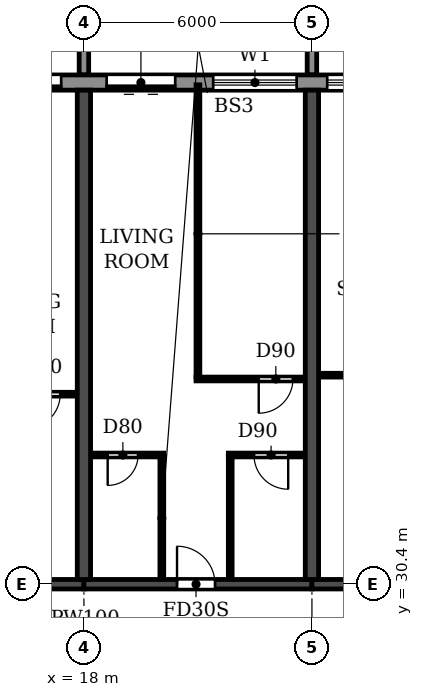
"""IFC4 building model, lengths in metres.
Left out: names, types, materials, properties, quantities, classifications, styles, units other than length and angle.
Written with IfcOpenShell. Run it as: python <this file> out.ifc"""

import sys

from ifc_helpers import new_model, si_unit, direction, frame, frame_2d, origin, place, context, subcontext, project, spatial, polyline, rectangle, outline, extrude, source, transform, mapped, element, fill, save


model = new_model("IFC4")
c1 = context("Model", 3, precision=1e-05, world=origin(), true_north=direction((0.0, 1.0)))
c2 = subcontext(c1, "Body", "Model", "MODEL_VIEW")
j1 = project(units=[si_unit("LENGTHUNIT", "METRE"), si_unit("PLANEANGLEUNIT", "RADIAN")], contexts=[c1])
p1 = place(None, origin())
s1 = spatial("IfcSite", under=j1, at=p1, CompositionType="ELEMENT")
p2 = place(p1, origin())
s2 = spatial("IfcBuilding", under=s1, at=p2, CompositionType="ELEMENT")
p3 = place(p2, frame((0.0, 0.0, 72.9)))
s3 = spatial("IfcBuildingStorey", under=s2, at=p3, CompositionType="ELEMENT", Elevation=72.9)
for number, where, z_axis, x_axis in (
    (1, (18.0, 30.525, 0.0), (0.0, 0.0, 1.0), (0.0, 1.0, 0.0)),
    (2, (24.0, 30.525, 0.0), (0.0, 0.0, 1.0), (0.0, 1.0, 0.0)),
):
    element("IfcWall", number, at=place(p3, frame(where, z_axis=z_axis, x_axis=x_axis)), inside=s3, PredefinedType="SHEAR", context=c2, shape_type="SweptSolid", body=[
        extrude(rectangle(XDim=12.875, YDim=0.35, at=frame_2d((6.438, 0.0))), origin(), (0.0, 0.0, 1.0), 3.06),
    ])
p4 = place(p3, frame((12.0, 30.4, 0.0), z_axis=(0.0, 0.0, 1.0), x_axis=(1.0, 0.0, 0.0)))
e3 = element("IfcWall", 3, at=p4, inside=s3, PredefinedType="SHEAR", context=c2, shape_type="SweptSolid", body=[
    extrude(rectangle(XDim=6.0, YDim=0.25, at=frame_2d((3.0, 0.0))), origin(), (0.0, 0.0, 1.0), 2.46),
])
p5 = place(p4, frame((2.45, 0.0, 0.0)))
e4 = element("IfcOpeningElement", 4, at=p5, cuts=e3, PredefinedType="OPENING", context=c2, shape_type="SweptSolid", body=[
    extrude(rectangle(XDim=1.0, YDim=2.1, at=frame_2d((0.5, 1.05))), frame((0.0, 0.135, 0.0), z_axis=(0.0, -1.0, 0.0), x_axis=(1.0, 0.0, 0.0)), (0.0, 0.0, 1.0), 0.27),
])
p6 = place(p3, frame((18.0, 30.4, 0.0), z_axis=(0.0, 0.0, 1.0), x_axis=(1.0, 0.0, 0.0)))
e5 = element("IfcWall", 5, at=p6, inside=s3, PredefinedType="SHEAR", context=c2, shape_type="SweptSolid", body=[
    extrude(rectangle(XDim=6.0, YDim=0.25, at=frame_2d((3.0, 0.0))), origin(), (0.0, 0.0, 1.0), 2.46),
])
p7 = place(p6, frame((2.45, 0.0, 0.0)))
e6 = element("IfcOpeningElement", 6, at=p7, cuts=e5, PredefinedType="OPENING", context=c2, shape_type="SweptSolid", body=[
    extrude(rectangle(XDim=1.0, YDim=2.1, at=frame_2d((0.5, 1.05))), frame((0.0, 0.135, 0.0), z_axis=(0.0, -1.0, 0.0), x_axis=(1.0, 0.0, 0.0)), (0.0, 0.0, 1.0), 0.27),
])
p8 = place(p3, frame((24.0, 30.4, 0.0), z_axis=(0.0, 0.0, 1.0), x_axis=(1.0, 0.0, 0.0)))
e7 = element("IfcWall", 7, at=p8, inside=s3, PredefinedType="SHEAR", context=c2, shape_type="SweptSolid", body=[
    extrude(rectangle(XDim=6.0, YDim=0.25, at=frame_2d((3.0, 0.0))), origin(), (0.0, 0.0, 1.0), 2.46),
])
p9 = place(p8, frame((2.55, 0.0, 0.0)))
e8 = element("IfcOpeningElement", 8, at=p9, cuts=e7, PredefinedType="OPENING", context=c2, shape_type="SweptSolid", body=[
    extrude(rectangle(XDim=1.0, YDim=2.1, at=frame_2d((0.5, 1.05))), frame((0.0, 0.135, 0.0), z_axis=(0.0, -1.0, 0.0), x_axis=(1.0, 0.0, 0.0)), (0.0, 0.0, 1.0), 0.27),
])
p10 = place(p3, frame((91.317, 43.6, 0.0), z_axis=(0.0, 0.0, 1.0), x_axis=(-1.0, 0.0, 0.0)))
e9 = element("IfcWall", 9, at=p10, inside=s3, PredefinedType="STANDARD", context=c2, shape_type="SweptSolid", body=[
    extrude(rectangle(XDim=80.634, YDim=0.4, at=frame_2d((40.317, 0.0))), origin(), (0.0, 0.0, 1.0), 3.06),
])
p11 = place(p10, frame((76.717, 0.0, 0.9)))
e10 = element("IfcOpeningElement", 10, at=p11, cuts=e9, PredefinedType="OPENING", context=c2, shape_type="SweptSolid", body=[
    extrude(rectangle(XDim=2.2, YDim=1.5, at=frame_2d((1.1, 0.75))), frame((0.0, 0.21, 0.0), z_axis=(0.0, -1.0, 0.0), x_axis=(1.0, 0.0, 0.0)), (0.0, 0.0, 1.0), 0.42),
])
p12 = place(p10, frame((73.917, 0.0, 0.0)))
e11 = element("IfcOpeningElement", 11, at=p12, cuts=e9, PredefinedType="OPENING", context=c2, shape_type="SweptSolid", body=[
    extrude(rectangle(XDim=1.8, YDim=2.4, at=frame_2d((0.9, 1.2))), frame((0.0, 0.21, 0.0), z_axis=(0.0, -1.0, 0.0), x_axis=(1.0, 0.0, 0.0)), (0.0, 0.0, 1.0), 0.42),
])
p13 = place(p10, frame((70.917, 0.0, 0.0)))
e12 = element("IfcOpeningElement", 12, at=p13, cuts=e9, PredefinedType="OPENING", context=c2, shape_type="SweptSolid", body=[
    extrude(rectangle(XDim=1.8, YDim=2.4, at=frame_2d((0.9, 1.2))), frame((0.0, 0.21, 0.0), z_axis=(0.0, -1.0, 0.0), x_axis=(1.0, 0.0, 0.0)), (0.0, 0.0, 1.0), 0.42),
])
p14 = place(p10, frame((67.717, 0.0, 0.9)))
e13 = element("IfcOpeningElement", 13, at=p14, cuts=e9, PredefinedType="OPENING", context=c2, shape_type="SweptSolid", body=[
    extrude(rectangle(XDim=2.2, YDim=1.5, at=frame_2d((1.1, 0.75))), frame((0.0, 0.21, 0.0), z_axis=(0.0, -1.0, 0.0), x_axis=(1.0, 0.0, 0.0)), (0.0, 0.0, 1.0), 0.42),
])
p15 = place(p10, frame((64.717, 0.0, 0.9)))
e14 = element("IfcOpeningElement", 14, at=p15, cuts=e9, PredefinedType="OPENING", context=c2, shape_type="SweptSolid", body=[
    extrude(rectangle(XDim=2.2, YDim=1.5, at=frame_2d((1.1, 0.75))), frame((0.0, 0.21, 0.0), z_axis=(0.0, -1.0, 0.0), x_axis=(1.0, 0.0, 0.0)), (0.0, 0.0, 1.0), 0.42),
])
p16 = place(p10, frame((61.917, 0.0, 0.0)))
e15 = element("IfcOpeningElement", 15, at=p16, cuts=e9, PredefinedType="OPENING", context=c2, shape_type="SweptSolid", body=[
    extrude(rectangle(XDim=1.8, YDim=2.4, at=frame_2d((0.9, 1.2))), frame((0.0, 0.21, 0.0), z_axis=(0.0, -1.0, 0.0), x_axis=(1.0, 0.0, 0.0)), (0.0, 0.0, 1.0), 0.42),
])
p17 = place(p10, frame((58.717, 0.0, 0.9)))
e16 = element("IfcOpeningElement", 16, at=p17, cuts=e9, PredefinedType="OPENING", context=c2, shape_type="SweptSolid", body=[
    extrude(rectangle(XDim=2.2, YDim=1.5, at=frame_2d((1.1, 0.75))), frame((0.0, 0.21, 0.0), z_axis=(0.0, -1.0, 0.0), x_axis=(1.0, 0.0, 0.0)), (0.0, 0.0, 1.0), 0.42),
])
p18 = place(p10, frame((55.917, 0.0, 0.0)))
e17 = element("IfcOpeningElement", 17, at=p18, cuts=e9, PredefinedType="OPENING", context=c2, shape_type="SweptSolid", body=[
    extrude(rectangle(XDim=1.8, YDim=2.4, at=frame_2d((0.9, 1.2))), frame((0.0, 0.21, 0.0), z_axis=(0.0, -1.0, 0.0), x_axis=(1.0, 0.0, 0.0)), (0.0, 0.0, 1.0), 0.42),
])
p19 = place(p10, frame((52.717, 0.0, 0.9)))
e18 = element("IfcOpeningElement", 18, at=p19, cuts=e9, PredefinedType="OPENING", context=c2, shape_type="SweptSolid", body=[
    extrude(rectangle(XDim=2.2, YDim=1.5, at=frame_2d((1.1, 0.75))), frame((0.0, 0.21, 0.0), z_axis=(0.0, -1.0, 0.0), x_axis=(1.0, 0.0, 0.0)), (0.0, 0.0, 1.0), 0.42),
])
p20 = place(p10, frame((49.717, 0.0, 0.9)))
e19 = element("IfcOpeningElement", 19, at=p20, cuts=e9, PredefinedType="OPENING", context=c2, shape_type="SweptSolid", body=[
    extrude(rectangle(XDim=2.2, YDim=1.5, at=frame_2d((1.1, 0.75))), frame((0.0, 0.21, 0.0), z_axis=(0.0, -1.0, 0.0), x_axis=(1.0, 0.0, 0.0)), (0.0, 0.0, 1.0), 0.42),
])
p21 = place(p10, frame((46.917, 0.0, 0.0)))
e20 = element("IfcOpeningElement", 20, at=p21, cuts=e9, PredefinedType="OPENING", context=c2, shape_type="SweptSolid", body=[
    extrude(rectangle(XDim=1.8, YDim=2.4, at=frame_2d((0.9, 1.2))), frame((0.0, 0.21, 0.0), z_axis=(0.0, -1.0, 0.0), x_axis=(1.0, 0.0, 0.0)), (0.0, 0.0, 1.0), 0.42),
])
p22 = place(p10, frame((43.717, 0.0, 0.9)))
e21 = element("IfcOpeningElement", 21, at=p22, cuts=e9, PredefinedType="OPENING", context=c2, shape_type="SweptSolid", body=[
    extrude(rectangle(XDim=2.2, YDim=1.5, at=frame_2d((1.1, 0.75))), frame((0.0, 0.21, 0.0), z_axis=(0.0, -1.0, 0.0), x_axis=(1.0, 0.0, 0.0)), (0.0, 0.0, 1.0), 0.42),
])
p23 = place(p10, frame((40.717, 0.0, 0.9)))
e22 = element("IfcOpeningElement", 22, at=p23, cuts=e9, PredefinedType="OPENING", context=c2, shape_type="SweptSolid", body=[
    extrude(rectangle(XDim=2.2, YDim=1.5, at=frame_2d((1.1, 0.75))), frame((0.0, 0.21, 0.0), z_axis=(0.0, -1.0, 0.0), x_axis=(1.0, 0.0, 0.0)), (0.0, 0.0, 1.0), 0.42),
])
p24 = place(p10, frame((37.917, 0.0, 0.0)))
e23 = element("IfcOpeningElement", 23, at=p24, cuts=e9, PredefinedType="OPENING", context=c2, shape_type="SweptSolid", body=[
    extrude(rectangle(XDim=1.8, YDim=2.4, at=frame_2d((0.9, 1.2))), frame((0.0, 0.21, 0.0), z_axis=(0.0, -1.0, 0.0), x_axis=(1.0, 0.0, 0.0)), (0.0, 0.0, 1.0), 0.42),
])
p25 = place(p10, frame((34.717, 0.0, 0.9)))
e24 = element("IfcOpeningElement", 24, at=p25, cuts=e9, PredefinedType="OPENING", context=c2, shape_type="SweptSolid", body=[
    extrude(rectangle(XDim=2.2, YDim=1.5, at=frame_2d((1.1, 0.75))), frame((0.0, 0.21, 0.0), z_axis=(0.0, -1.0, 0.0), x_axis=(1.0, 0.0, 0.0)), (0.0, 0.0, 1.0), 0.42),
])
p26 = place(p10, frame((31.917, 0.0, 0.0)))
e25 = element("IfcOpeningElement", 25, at=p26, cuts=e9, PredefinedType="OPENING", context=c2, shape_type="SweptSolid", body=[
    extrude(rectangle(XDim=1.8, YDim=2.4, at=frame_2d((0.9, 1.2))), frame((0.0, 0.21, 0.0), z_axis=(0.0, -1.0, 0.0), x_axis=(1.0, 0.0, 0.0)), (0.0, 0.0, 1.0), 0.42),
])
p27 = place(p10, frame((28.717, 0.0, 0.9)))
e26 = element("IfcOpeningElement", 26, at=p27, cuts=e9, PredefinedType="OPENING", context=c2, shape_type="SweptSolid", body=[
    extrude(rectangle(XDim=2.2, YDim=1.5, at=frame_2d((1.1, 0.75))), frame((0.0, 0.21, 0.0), z_axis=(0.0, -1.0, 0.0), x_axis=(1.0, 0.0, 0.0)), (0.0, 0.0, 1.0), 0.42),
])
p28 = place(p10, frame((25.717, 0.0, 0.9)))
e27 = element("IfcOpeningElement", 27, at=p28, cuts=e9, PredefinedType="OPENING", context=c2, shape_type="SweptSolid", body=[
    extrude(rectangle(XDim=2.2, YDim=1.5, at=frame_2d((1.1, 0.75))), frame((0.0, 0.21, 0.0), z_axis=(0.0, -1.0, 0.0), x_axis=(1.0, 0.0, 0.0)), (0.0, 0.0, 1.0), 0.42),
])
p29 = place(p10, frame((22.717, 0.0, 0.9)))
e28 = element("IfcOpeningElement", 28, at=p29, cuts=e9, PredefinedType="OPENING", context=c2, shape_type="SweptSolid", body=[
    extrude(rectangle(XDim=2.2, YDim=1.5, at=frame_2d((1.1, 0.75))), frame((0.0, 0.21, 0.0), z_axis=(0.0, -1.0, 0.0), x_axis=(1.0, 0.0, 0.0)), (0.0, 0.0, 1.0), 0.42),
])
p30 = place(p10, frame((19.917, 0.0, 0.0)))
e29 = element("IfcOpeningElement", 29, at=p30, cuts=e9, PredefinedType="OPENING", context=c2, shape_type="SweptSolid", body=[
    extrude(rectangle(XDim=1.8, YDim=2.4, at=frame_2d((0.9, 1.2))), frame((0.0, 0.21, 0.0), z_axis=(0.0, -1.0, 0.0), x_axis=(1.0, 0.0, 0.0)), (0.0, 0.0, 1.0), 0.42),
])
p31 = place(p10, frame((16.717, 0.0, 0.9)))
e30 = element("IfcOpeningElement", 30, at=p31, cuts=e9, PredefinedType="OPENING", context=c2, shape_type="SweptSolid", body=[
    extrude(rectangle(XDim=2.2, YDim=1.5, at=frame_2d((1.1, 0.75))), frame((0.0, 0.21, 0.0), z_axis=(0.0, -1.0, 0.0), x_axis=(1.0, 0.0, 0.0)), (0.0, 0.0, 1.0), 0.42),
])
p32 = place(p10, frame((13.717, 0.0, 0.9)))
e31 = element("IfcOpeningElement", 31, at=p32, cuts=e9, PredefinedType="OPENING", context=c2, shape_type="SweptSolid", body=[
    extrude(rectangle(XDim=2.2, YDim=1.5, at=frame_2d((1.1, 0.75))), frame((0.0, 0.21, 0.0), z_axis=(0.0, -1.0, 0.0), x_axis=(1.0, 0.0, 0.0)), (0.0, 0.0, 1.0), 0.42),
])
p33 = place(p10, frame((10.717, 0.0, 0.9)))
e32 = element("IfcOpeningElement", 32, at=p33, cuts=e9, PredefinedType="OPENING", context=c2, shape_type="SweptSolid", body=[
    extrude(rectangle(XDim=2.2, YDim=1.5, at=frame_2d((1.1, 0.75))), frame((0.0, 0.21, 0.0), z_axis=(0.0, -1.0, 0.0), x_axis=(1.0, 0.0, 0.0)), (0.0, 0.0, 1.0), 0.42),
])
p34 = place(p10, frame((7.917, 0.0, 0.0)))
e33 = element("IfcOpeningElement", 33, at=p34, cuts=e9, PredefinedType="OPENING", context=c2, shape_type="SweptSolid", body=[
    extrude(rectangle(XDim=1.8, YDim=2.4, at=frame_2d((0.9, 1.2))), frame((0.0, 0.21, 0.0), z_axis=(0.0, -1.0, 0.0), x_axis=(1.0, 0.0, 0.0)), (0.0, 0.0, 1.0), 0.42),
])
p35 = place(p10, frame((4.717, 0.0, 0.9)))
e34 = element("IfcOpeningElement", 34, at=p35, cuts=e9, PredefinedType="OPENING", context=c2, shape_type="SweptSolid", body=[
    extrude(rectangle(XDim=2.2, YDim=1.5, at=frame_2d((1.1, 0.75))), frame((0.0, 0.21, 0.0), z_axis=(0.0, -1.0, 0.0), x_axis=(1.0, 0.0, 0.0)), (0.0, 0.0, 1.0), 0.42),
])
p36 = place(p10, frame((1.917, 0.0, 0.0)))
e35 = element("IfcOpeningElement", 35, at=p36, cuts=e9, PredefinedType="OPENING", context=c2, shape_type="SweptSolid", body=[
    extrude(rectangle(XDim=1.8, YDim=2.4, at=frame_2d((0.9, 1.2))), frame((0.0, 0.21, 0.0), z_axis=(0.0, -1.0, 0.0), x_axis=(1.0, 0.0, 0.0)), (0.0, 0.0, 1.0), 0.42),
])
m1 = source(origin(), c2, "Body", "SweptSolid", [
    extrude(outline(polyline([(0.0, 0.0), (0.25, 0.0), (0.25, 3.1), (0.0, 3.1), (0.0, 0.0)])), origin(), (0.0, 0.0, 1.0), 3.1),
])
for number, where in (
    (36, (17.875, 43.8, 0.0)),
    (37, (23.875, 43.8, 0.0)),
):
    element("IfcWall", number, at=place(p3, frame(where)), inside=s3, PredefinedType="STANDARD", context=c2, shape_type="MappedRepresentation", body=[
        mapped(m1, transform((0.0, 0.0, 0.0))),
    ])
p37 = place(p3, frame((18.185, 33.8, 0.0), z_axis=(0.0, 0.0, 1.0), x_axis=(1.0, 0.0, 0.0)))
e38 = element("IfcWall", 38, at=p37, inside=s3, PredefinedType="PARTITIONING", context=c2, shape_type="SweptSolid", body=[
    extrude(rectangle(XDim=1.915, YDim=0.1, at=frame_2d((0.958, 0.0))), origin(), (0.0, 0.0, 1.0), 3.06),
])
p38 = place(p37, frame((0.44, 0.0, 0.0)))
e39 = element("IfcOpeningElement", 39, at=p38, cuts=e38, PredefinedType="OPENING", context=c2, shape_type="SweptSolid", body=[
    extrude(rectangle(XDim=0.8, YDim=2.1, at=frame_2d((0.4, 1.05))), frame((0.0, 0.06, 0.0), z_axis=(0.0, -1.0, 0.0), x_axis=(1.0, 0.0, 0.0)), (0.0, 0.0, 1.0), 0.12),
])
p39 = place(p3, frame((21.8, 33.8, 0.0), z_axis=(0.0, 0.0, 1.0), x_axis=(1.0, 0.0, 0.0)))
e40 = element("IfcWall", 40, at=p39, inside=s3, PredefinedType="PARTITIONING", context=c2, shape_type="SweptSolid", body=[
    extrude(rectangle(XDim=2.015, YDim=0.1, at=frame_2d((1.007, 0.0))), origin(), (0.0, 0.0, 1.0), 3.06),
])
p40 = place(p39, frame((0.675, 0.0, 0.0)))
e41 = element("IfcOpeningElement", 41, at=p40, cuts=e40, PredefinedType="OPENING", context=c2, shape_type="SweptSolid", body=[
    extrude(rectangle(XDim=0.9, YDim=2.1, at=frame_2d((0.45, 1.05))), frame((0.0, 0.06, 0.0), z_axis=(0.0, -1.0, 0.0), x_axis=(1.0, 0.0, 0.0)), (0.0, 0.0, 1.0), 0.12),
])
p41 = place(p3, frame((15.8, 35.4, 0.0), z_axis=(0.0, 0.0, 1.0), x_axis=(1.0, 0.0, 0.0)))
e42 = element("IfcWall", 42, at=p41, inside=s3, PredefinedType="PARTITIONING", context=c2, shape_type="SweptSolid", body=[
    extrude(rectangle(XDim=2.015, YDim=0.1, at=frame_2d((1.007, 0.0))), origin(), (0.0, 0.0, 1.0), 3.06),
])
p42 = place(p41, frame((0.675, 0.0, 0.0)))
e43 = element("IfcOpeningElement", 43, at=p42, cuts=e42, PredefinedType="OPENING", context=c2, shape_type="SweptSolid", body=[
    extrude(rectangle(XDim=0.9, YDim=2.1, at=frame_2d((0.45, 1.05))), frame((0.0, 0.06, 0.0), z_axis=(0.0, -1.0, 0.0), x_axis=(1.0, 0.0, 0.0)), (0.0, 0.0, 1.0), 0.12),
])
p43 = place(p3, frame((20.95, 35.8, 0.0), z_axis=(0.0, 0.0, 1.0), x_axis=(1.0, 0.0, 0.0)))
e44 = element("IfcWall", 44, at=p43, inside=s3, PredefinedType="PARTITIONING", context=c2, shape_type="SweptSolid", body=[
    extrude(rectangle(XDim=2.865, YDim=0.1, at=frame_2d((1.433, 0.0))), origin(), (0.0, 0.0, 1.0), 3.06),
])
p44 = place(p43, frame((1.65, 0.0, 0.0)))
e45 = element("IfcOpeningElement", 45, at=p44, cuts=e44, PredefinedType="OPENING", context=c2, shape_type="SweptSolid", body=[
    extrude(rectangle(XDim=0.9, YDim=2.1, at=frame_2d((0.45, 1.05))), frame((0.0, 0.06, 0.0), z_axis=(0.0, -1.0, 0.0), x_axis=(1.0, 0.0, 0.0)), (0.0, 0.0, 1.0), 0.12),
])
p45 = place(p3, frame((24.185, 35.9, 0.0), z_axis=(0.0, 0.0, 1.0), x_axis=(1.0, 0.0, 0.0)))
e46 = element("IfcWall", 46, at=p45, inside=s3, PredefinedType="PARTITIONING", context=c2, shape_type="SweptSolid", body=[
    extrude(rectangle(XDim=2.015, YDim=0.1, at=frame_2d((1.007, 0.0))), origin(), (0.0, 0.0, 1.0), 3.06),
])
p46 = place(p3, frame((20.05, 30.535, 0.0), z_axis=(0.0, 0.0, 1.0), x_axis=(0.0, 1.0, 0.0)))
e47 = element("IfcWall", 47, at=p46, inside=s3, PredefinedType="PARTITIONING", context=c2, shape_type="SweptSolid", body=[
    extrude(rectangle(XDim=3.215, YDim=0.1, at=frame_2d((1.607, 0.0))), origin(), (0.0, 0.0, 1.0), 3.06),
])
p47 = place(p3, frame((21.0, 35.85, 0.0), z_axis=(0.0, 0.0, 1.0), x_axis=(0.0, 1.0, 0.0)))
e48 = element("IfcWall", 48, at=p47, inside=s3, PredefinedType="PARTITIONING", context=c2, shape_type="SweptSolid", body=[
    extrude(rectangle(XDim=7.69, YDim=0.1, at=frame_2d((3.845, 0.0))), origin(), (0.0, 0.0, 1.0), 3.06),
])
p48 = place(p3, frame((21.85, 30.535, 0.0), z_axis=(0.0, 0.0, 1.0), x_axis=(0.0, 1.0, 0.0)))
e49 = element("IfcWall", 49, at=p48, inside=s3, PredefinedType="PARTITIONING", context=c2, shape_type="SweptSolid", body=[
    extrude(rectangle(XDim=3.215, YDim=0.1, at=frame_2d((1.607, 0.0))), origin(), (0.0, 0.0, 1.0), 3.06),
])
p49 = place(p12, origin())
e50 = element("IfcDoor", 50, at=p49, inside=s3, OperationType="DOUBLE_DOOR_SLIDING", PredefinedType="DOOR", context=c2, shape_type="SweptSolid", body=[
    extrude(rectangle(XDim=1.8, YDim=2.4, at=frame_2d((0.9, 1.2))), frame((0.0, 0.025, 0.0), z_axis=(0.0, -1.0, 0.0), x_axis=(1.0, 0.0, 0.0)), (0.0, 0.0, 1.0), 0.05),
])
fill(e11, e50)
p50 = place(p13, origin())
e51 = element("IfcDoor", 51, at=p50, inside=s3, OperationType="DOUBLE_DOOR_SLIDING", PredefinedType="DOOR", context=c2, shape_type="SweptSolid", body=[
    extrude(rectangle(XDim=1.8, YDim=2.4, at=frame_2d((0.9, 1.2))), frame((0.0, 0.025, 0.0), z_axis=(0.0, -1.0, 0.0), x_axis=(1.0, 0.0, 0.0)), (0.0, 0.0, 1.0), 0.05),
])
fill(e12, e51)
p51 = place(p14, origin())
e52 = element("IfcWindow", 52, at=p51, inside=s3, PartitioningType="DOUBLE_PANEL_HORIZONTAL", PredefinedType="WINDOW", context=c2, shape_type="SweptSolid", body=[
    extrude(rectangle(XDim=2.2, YDim=1.5, at=frame_2d((1.1, 0.75))), frame((0.0, 0.03, 0.0), z_axis=(0.0, -1.0, 0.0), x_axis=(1.0, 0.0, 0.0)), (0.0, 0.0, 1.0), 0.06),
])
fill(e13, e52)
p52 = place(p15, origin())
e53 = element("IfcWindow", 53, at=p52, inside=s3, PartitioningType="DOUBLE_PANEL_HORIZONTAL", PredefinedType="WINDOW", context=c2, shape_type="SweptSolid", body=[
    extrude(rectangle(XDim=2.2, YDim=1.5, at=frame_2d((1.1, 0.75))), frame((0.0, 0.03, 0.0), z_axis=(0.0, -1.0, 0.0), x_axis=(1.0, 0.0, 0.0)), (0.0, 0.0, 1.0), 0.06),
])
fill(e14, e53)
p53 = place(p42, frame((0.9, 0.0, 0.0), z_axis=(0.0, 0.0, 1.0), x_axis=(-1.0, 0.0, 0.0)))
e54 = element("IfcDoor", 54, at=p53, inside=s3, OperationType="SINGLE_SWING_RIGHT", PredefinedType="DOOR", context=c2, shape_type="SweptSolid", body=[
    extrude(rectangle(XDim=0.9, YDim=2.1, at=frame_2d((0.45, 1.05))), frame((0.0, 0.025, 0.0), z_axis=(0.0, -1.0, 0.0), x_axis=(1.0, 0.0, 0.0)), (0.0, 0.0, 1.0), 0.05),
])
fill(e43, e54)
p54 = place(p38, frame((0.8, 0.0, 0.0), z_axis=(0.0, 0.0, 1.0), x_axis=(-1.0, 0.0, 0.0)))
e55 = element("IfcDoor", 55, at=p54, inside=s3, OperationType="SINGLE_SWING_RIGHT", PredefinedType="DOOR", context=c2, shape_type="SweptSolid", body=[
    extrude(rectangle(XDim=0.8, YDim=2.1, at=frame_2d((0.4, 1.05))), frame((0.0, 0.025, 0.0), z_axis=(0.0, -1.0, 0.0), x_axis=(1.0, 0.0, 0.0)), (0.0, 0.0, 1.0), 0.05),
])
fill(e39, e55)
p55 = place(p7, origin())
e56 = element("IfcDoor", 56, at=p55, inside=s3, OperationType="SINGLE_SWING_LEFT", PredefinedType="DOOR", context=c2, shape_type="SweptSolid", body=[
    extrude(rectangle(XDim=1.0, YDim=2.1, at=frame_2d((0.5, 1.05))), frame((0.0, 0.025, 0.0), z_axis=(0.0, -1.0, 0.0), x_axis=(1.0, 0.0, 0.0)), (0.0, 0.0, 1.0), 0.05),
])
fill(e6, e56)
p56 = place(p40, frame((0.9, 0.0, 0.0), z_axis=(0.0, 0.0, 1.0), x_axis=(-1.0, 0.0, 0.0)))
e57 = element("IfcDoor", 57, at=p56, inside=s3, OperationType="SINGLE_SWING_LEFT", PredefinedType="DOOR", context=c2, shape_type="SweptSolid", body=[
    extrude(rectangle(XDim=0.9, YDim=2.1, at=frame_2d((0.45, 1.05))), frame((0.0, 0.025, 0.0), z_axis=(0.0, -1.0, 0.0), x_axis=(1.0, 0.0, 0.0)), (0.0, 0.0, 1.0), 0.05),
])
fill(e41, e57)
p57 = place(p44, frame((0.9, 0.0, 0.0), z_axis=(0.0, 0.0, 1.0), x_axis=(-1.0, 0.0, 0.0)))
e58 = element("IfcDoor", 58, at=p57, inside=s3, OperationType="SINGLE_SWING_RIGHT", PredefinedType="DOOR", context=c2, shape_type="SweptSolid", body=[
    extrude(rectangle(XDim=0.9, YDim=2.1, at=frame_2d((0.45, 1.05))), frame((0.0, 0.025, 0.0), z_axis=(0.0, -1.0, 0.0), x_axis=(1.0, 0.0, 0.0)), (0.0, 0.0, 1.0), 0.05),
])
fill(e45, e58)
save(model, sys.argv[1])
